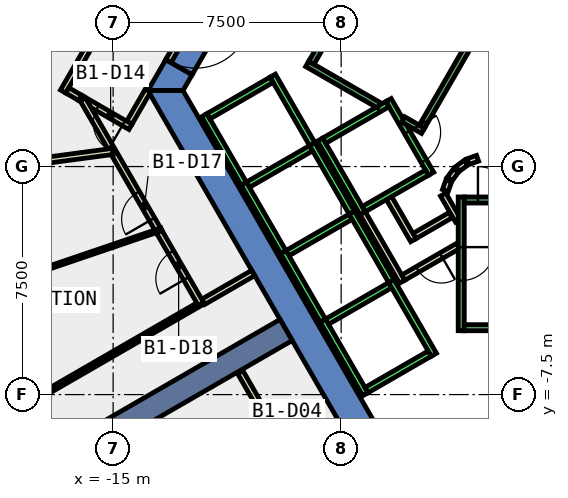
"""IFC4 building model, lengths in metres.
Left out: names, types, materials, properties, quantities, classifications, styles, units other than length and angle.
Written with IfcOpenShell. Run it as: python <this file> out.ifc"""

import sys

from ifc_helpers import new_model, si_unit, direction, frame, frame_2d, origin, place, context, subcontext, project, spatial, polyline, rectangle, outline, extrude, element, fill, save


model = new_model("IFC4")
c1 = context("Model", 3, precision=1e-05, world=origin(), true_north=direction((0.0, 1.0)))
c2 = subcontext(c1, "Body", "Model", "MODEL_VIEW")
j1 = project(units=[si_unit("LENGTHUNIT", "METRE"), si_unit("PLANEANGLEUNIT", "RADIAN")], contexts=[c1])
p1 = place(None, origin())
s1 = spatial("IfcSite", under=j1, at=p1, CompositionType="ELEMENT")
p2 = place(p1, origin())
s2 = spatial("IfcBuilding", under=s1, at=p2, CompositionType="ELEMENT")
p3 = place(p2, frame((0.0, 0.0, -5.5)))
s3 = spatial("IfcBuildingStorey", under=s2, at=p3, CompositionType="ELEMENT", Elevation=-5.5)
p4 = place(p3, frame((0.0, 0.0, -0.42)))
e1 = element("IfcWall", 1, at=p4, inside=s3, PredefinedType="SHEAR", context=c2, shape_type="SweptSolid", body=[
    extrude(outline(polyline([(-12.402, 3.02), (-13.267, 3.52), (-13.856, 2.5), (-12.702, 2.5), (-12.402, 3.02)])), origin(), (0.0, 0.0, 1.0), 5.42),
])
p5 = place(p3, frame((0.0, 0.0, 3.6)))
e2 = element("IfcWall", 2, at=p5, inside=s3, PredefinedType="SHEAR", context=c2, shape_type="SweptSolid", body=[
    extrude(outline(polyline([(-13.267, 3.52), (-12.402, 3.02), (-11.402, 4.752), (-12.267, 5.252), (-13.267, 3.52)])), origin(), (0.0, 0.0, 1.0), 1.4),
])
p6 = place(p3, frame((0.0, 0.0, -0.42)))
e3 = element("IfcWall", 3, at=p6, inside=s3, PredefinedType="SHEAR", context=c2, shape_type="SweptSolid", body=[
    extrude(outline(polyline([(-13.856, 2.5), (-6.928, -9.5), (-6.351, -8.5), (-12.702, 2.5), (-13.856, 2.5)])), origin(), (0.0, 0.0, 1.0), 5.42),
])
p7 = place(p3, frame((-9.31, -5.375, -0.42), z_axis=(0.0, 0.0, 1.0), x_axis=(-0.866017533419, -0.500013631625, 0.0)))
e4 = element("IfcWall", 4, at=p7, inside=s3, PredefinedType="SHEAR", context=c2, shape_type="SweptSolid", body=[
    extrude(rectangle(XDim=9.0, YDim=0.8, at=frame_2d((4.5, 0.0))), origin(), (0.0, 0.0, 1.0), 5.42),
])
p8 = place(p3, frame((-8.033, -11.587, 0.0), z_axis=(0.0, 0.0, 1.0), x_axis=(-0.499991937534, 0.866030058601, 0.0)))
e5 = element("IfcWall", 5, at=p8, inside=s3, PredefinedType="PARTITIONING", context=c2, shape_type="SweptSolid", body=[
    extrude(rectangle(XDim=5.568, YDim=0.2, at=frame_2d((2.784, 0.0))), origin(), (0.0, 0.0, 1.0), 4.9),
])
p9 = place(p8, frame((1.988, 0.0, 0.0)))
e6 = element("IfcOpeningElement", 6, at=p9, cuts=e5, PredefinedType="OPENING", context=c2, shape_type="SweptSolid", body=[
    extrude(rectangle(XDim=1.0, YDim=2.1, at=frame_2d((0.5, 1.05))), frame((0.0, 0.11, 0.0), z_axis=(0.0, -1.0, 0.0), x_axis=(1.0, 0.0, 0.0)), (0.0, 0.0, 1.0), 0.22),
])
p10 = place(p3, frame((-12.037, -4.45, 0.0), z_axis=(0.0, 0.0, 1.0), x_axis=(0.865980106173, 0.500078449558, 0.0)))
e7 = element("IfcWall", 7, at=p10, inside=s3, PredefinedType="PARTITIONING", context=c2, shape_type="SweptSolid", body=[
    extrude(rectangle(XDim=1.9, YDim=0.2, at=frame_2d((0.95, 0.0))), origin(), (0.0, 0.0, 1.0), 4.9),
])
p11 = place(p3, frame((-22.615, -10.556, 0.0), z_axis=(0.0, 0.0, 1.0), x_axis=(0.866067424309, 0.499927211253, 0.0)))
e8 = element("IfcWall", 8, at=p11, inside=s3, PredefinedType="PARTITIONING", context=c2, shape_type="SweptSolid", body=[
    extrude(rectangle(XDim=12.214, YDim=0.15, at=frame_2d((6.107, 0.0))), origin(), (0.0, 0.0, 1.0), 4.9),
])
p12 = place(p3, frame((-13.856, 2.5, 0.0), z_axis=(0.0, 0.0, 1.0), x_axis=(-0.500114474492, -0.865959301817, 0.0)))
e9 = element("IfcWall", 9, at=p12, inside=s3, PredefinedType="PARTITIONING", context=c2, shape_type="SweptSolid", body=[
    extrude(rectangle(XDim=1.222, YDim=0.2, at=frame_2d((0.611, 0.0))), origin(), (0.0, 0.0, 1.0), 4.9),
])
p13 = place(p3, frame((-14.43, 1.305, 0.0), z_axis=(0.0, 0.0, 1.0), x_axis=(-0.866000389056, 0.500043324278, 0.0)))
e10 = element("IfcWall", 10, at=p13, inside=s3, PredefinedType="PARTITIONING", context=c2, shape_type="SweptSolid", body=[
    extrude(rectangle(XDim=1.91, YDim=0.2, at=frame_2d((0.955, 0.0))), origin(), (0.0, 0.0, 1.0), 4.9),
])
p14 = place(p13, frame((0.254, 0.0, 0.0)))
e11 = element("IfcOpeningElement", 11, at=p14, cuts=e10, PredefinedType="OPENING", context=c2, shape_type="SweptSolid", body=[
    extrude(rectangle(XDim=1.0, YDim=2.1, at=frame_2d((0.5, 1.05))), frame((0.0, 0.11, 0.0), z_axis=(0.0, -1.0, 0.0), x_axis=(1.0, 0.0, 0.0)), (0.0, 0.0, 1.0), 0.22),
])
p15 = place(p3, frame((-16.645, 2.468, 0.0), z_axis=(0.0, 0.0, 1.0), x_axis=(0.499968011863, 0.866043871356, 0.0)))
e12 = element("IfcWall", 12, at=p15, inside=s3, PredefinedType="PARTITIONING", context=c2, shape_type="SweptSolid", body=[
    extrude(rectangle(XDim=7.201, YDim=0.2, at=frame_2d((3.6, 0.0))), origin(), (0.0, 0.0, 1.0), 4.9),
])
p16 = place(p15, frame((2.409, 0.0, 0.0)))
e13 = element("IfcOpeningElement", 13, at=p16, cuts=e12, PredefinedType="OPENING", context=c2, shape_type="SweptSolid", body=[
    extrude(rectangle(XDim=1.0, YDim=2.1, at=frame_2d((0.5, 1.05))), frame((0.0, 0.11, 0.0), z_axis=(0.0, -1.0, 0.0), x_axis=(1.0, 0.0, 0.0)), (0.0, 0.0, 1.0), 0.22),
])
p17 = place(p3, frame((-16.508, 2.505, 0.0), z_axis=(0.0, 0.0, 1.0), x_axis=(0.865494662716, -0.500918145819, 0.0)))
e14 = element("IfcWall", 14, at=p17, inside=s3, PredefinedType="PARTITIONING", context=c2, shape_type="SweptSolid", body=[
    extrude(rectangle(XDim=0.489, YDim=0.2, at=frame_2d((0.244, 0.0))), origin(), (0.0, 0.0, 1.0), 4.9),
])
p18 = place(p3, frame((-13.485, -2.142, 0.0), z_axis=(0.0, 0.0, 1.0), x_axis=(-0.500042049778, 0.866001124973, 0.0)))
e15 = element("IfcWall", 15, at=p18, inside=s3, PredefinedType="PARTITIONING", context=c2, shape_type="SweptSolid", body=[
    extrude(rectangle(XDim=5.025, YDim=0.2, at=frame_2d((2.513, 0.0))), origin(), (0.0, 0.0, 1.0), 4.9),
])
p19 = place(p18, frame((0.47, 0.0, 0.0)))
e16 = element("IfcOpeningElement", 16, at=p19, cuts=e15, PredefinedType="OPENING", context=c2, shape_type="SweptSolid", body=[
    extrude(rectangle(XDim=1.0, YDim=2.1, at=frame_2d((0.5, 1.05))), frame((0.0, 0.11, 0.0), z_axis=(0.0, -1.0, 0.0), x_axis=(1.0, 0.0, 0.0)), (0.0, 0.0, 1.0), 0.22),
])
p20 = place(p3, frame((-12.111, -4.522, 0.0), z_axis=(0.0, 0.0, 1.0), x_axis=(-0.499999305434, 0.866025804792, 0.0)))
e17 = element("IfcWall", 17, at=p20, inside=s3, PredefinedType="PARTITIONING", context=c2, shape_type="SweptSolid", body=[
    extrude(rectangle(XDim=2.748, YDim=0.2, at=frame_2d((1.374, 0.0))), origin(), (0.0, 0.0, 1.0), 4.9),
])
p21 = place(p20, frame((0.968, 0.0, 0.0)))
e18 = element("IfcOpeningElement", 18, at=p21, cuts=e17, PredefinedType="OPENING", context=c2, shape_type="SweptSolid", body=[
    extrude(rectangle(XDim=1.0, YDim=2.1, at=frame_2d((0.5, 1.05))), frame((0.0, 0.11, 0.0), z_axis=(0.0, -1.0, 0.0), x_axis=(1.0, 0.0, 0.0)), (0.0, 0.0, 1.0), 0.22),
])
p22 = place(p3, frame((-15.01, 0.498, 0.0), z_axis=(0.0, 0.0, 1.0), x_axis=(-0.991211581173, -0.132286058785, 0.0)))
e19 = element("IfcWall", 19, at=p22, inside=s3, PredefinedType="PARTITIONING", context=c2, shape_type="SweptSolid", body=[
    extrude(rectangle(XDim=7.582, YDim=0.2, at=frame_2d((3.791, 0.0))), origin(), (0.0, 0.0, 1.0), 4.9),
])
p23 = place(p3, frame((-13.416, -2.067, 0.0), z_axis=(0.0, 0.0, 1.0), x_axis=(-0.946668320361, -0.3222097007, 0.0)))
e20 = element("IfcWall", 20, at=p23, inside=s3, PredefinedType="PARTITIONING", context=c2, shape_type="SweptSolid", body=[
    extrude(rectangle(XDim=9.724, YDim=0.1, at=frame_2d((4.862, 0.0))), origin(), (0.0, 0.0, 1.0), 4.9),
])
p24 = place(p3, frame((-3.9, -1.599, 0.0), z_axis=(0.0, 0.0, 1.0), x_axis=(-0.865969445389, -0.500096910261, 0.0)))
e21 = element("IfcWall", 21, at=p24, inside=s3, PredefinedType="PARTITIONING", context=c2, shape_type="SweptSolid", body=[
    extrude(rectangle(XDim=1.373, YDim=0.2, at=frame_2d((0.687, 0.0))), origin(), (0.0, 0.0, 1.0), 4.9),
])
p25 = place(p3, frame((-5.126, -2.422, 0.0), z_axis=(0.0, 0.0, 1.0), x_axis=(-0.500062241894, 0.865989465428, 0.0)))
e22 = element("IfcWall", 22, at=p25, inside=s3, PredefinedType="PARTITIONING", context=c2, shape_type="SweptSolid", body=[
    extrude(rectangle(XDim=1.7, YDim=0.2, at=frame_2d((0.85, 0.0))), origin(), (0.0, 0.0, 1.0), 4.9),
])
p26 = place(p3, frame((-5.492, -3.788, 0.0), z_axis=(0.0, 0.0, 1.0), x_axis=(-0.500008949224, 0.866020236886, 0.0)))
e23 = element("IfcWall", 23, at=p26, inside=s3, PredefinedType="PARTITIONING", context=c2, shape_type="SweptSolid", body=[
    extrude(rectangle(XDim=2.68, YDim=0.2, at=frame_2d((1.34, 0.0))), origin(), (0.0, 0.0, 1.0), 4.9),
])
p27 = place(p3, frame((-4.145, -0.92, 0.0), z_axis=(0.0, 0.0, 1.0), x_axis=(0.499743786207, -0.866173278362, 0.0)))
e24 = element("IfcWall", 24, at=p27, inside=s3, PredefinedType="PARTITIONING", context=c2, shape_type="SweptSolid", body=[
    extrude(rectangle(XDim=0.991, YDim=0.2, at=frame_2d((0.495, 0.0))), origin(), (0.0, 0.0, 1.0), 4.9),
])
p28 = place(p3, frame((-3.65, -2.61, 0.0), z_axis=(0.0, 0.0, 1.0), x_axis=(-0.866072462134, -0.499918483688, 0.0)))
e25 = element("IfcWall", 25, at=p28, inside=s3, PredefinedType="PARTITIONING", context=c2, shape_type="SweptSolid", body=[
    extrude(rectangle(XDim=2.084, YDim=0.2, at=frame_2d((1.042, 0.0))), origin(), (0.0, 0.0, 1.0), 4.9),
])
p29 = place(p28, frame((0.642, 0.0, 0.0)))
e26 = element("IfcOpeningElement", 26, at=p29, cuts=e25, PredefinedType="OPENING", context=c2, shape_type="SweptSolid", body=[
    extrude(rectangle(XDim=0.9, YDim=2.1, at=frame_2d((0.45, 1.05))), frame((0.0, 0.11, 0.0), z_axis=(0.0, -1.0, 0.0), x_axis=(1.0, 0.0, 0.0)), (0.0, 0.0, 1.0), 0.22),
])
p30 = place(p3, frame((-3.012, 0.273, 0.0), z_axis=(0.0, 0.0, 1.0), x_axis=(-0.942280615813, -0.334824194261, 0.0)))
e27 = element("IfcWall", 27, at=p30, inside=s3, PredefinedType="PARTITIONING", context=c2, shape_type="SweptSolid", body=[
    extrude(rectangle(XDim=0.338, YDim=0.2, at=frame_2d((0.169, 0.0))), origin(), (0.0, 0.0, 1.0), 4.9),
])
p31 = place(p3, frame((-3.397, 0.124, 0.0), z_axis=(0.0, 0.0, 1.0), x_axis=(-0.804311165252, -0.594208338422, 0.0)))
e28 = element("IfcWall", 28, at=p31, inside=s3, PredefinedType="PARTITIONING", context=c2, shape_type="SweptSolid", body=[
    extrude(rectangle(XDim=0.338, YDim=0.2, at=frame_2d((0.169, 0.0))), origin(), (0.0, 0.0, 1.0), 4.9),
])
p32 = place(p3, frame((-3.723, -0.131, 0.0), z_axis=(0.0, 0.0, 1.0), x_axis=(-0.594675113454, -0.803966112121, 0.0)))
e29 = element("IfcWall", 29, at=p32, inside=s3, PredefinedType="PARTITIONING", context=c2, shape_type="SweptSolid", body=[
    extrude(rectangle(XDim=0.338, YDim=0.2, at=frame_2d((0.169, 0.0))), origin(), (0.0, 0.0, 1.0), 4.9),
])
p33 = place(p3, frame((-3.96, -0.47, 0.0), z_axis=(0.0, 0.0, 1.0), x_axis=(-0.334824194261, -0.942280615813, 0.0)))
e30 = element("IfcWall", 30, at=p33, inside=s3, PredefinedType="PARTITIONING", context=c2, shape_type="SweptSolid", body=[
    extrude(rectangle(XDim=0.338, YDim=0.2, at=frame_2d((0.169, 0.0))), origin(), (0.0, 0.0, 1.0), 4.9),
])
p34 = place(p3, frame((-2.771, 4.7, 0.0), z_axis=(0.0, 0.0, 1.0), x_axis=(0.499969479948, -0.866043023828, 0.0)))
e31 = element("IfcWall", 31, at=p34, inside=s3, PredefinedType="PARTITIONING", context=c2, shape_type="SweptSolid", body=[
    extrude(rectangle(XDim=4.99, YDim=0.2, at=frame_2d((2.495, 0.0))), origin(), (0.0, 0.0, 1.0), 4.9),
])
p35 = place(p34, frame((1.945, 0.0, 0.0)))
e32 = element("IfcOpeningElement", 32, at=p35, cuts=e31, PredefinedType="OPENING", context=c2, shape_type="SweptSolid", body=[
    extrude(rectangle(XDim=1.0, YDim=2.1, at=frame_2d((0.5, 1.05))), frame((0.0, 0.11, 0.0), z_axis=(0.0, -1.0, 0.0), x_axis=(1.0, 0.0, 0.0)), (0.0, 0.0, 1.0), 0.22),
])
p36 = place(p3, frame((-12.18, 5.202, 0.0), z_axis=(0.0, 0.0, 1.0), x_axis=(-0.50002537861, -0.866010750942, 0.0)))
e33 = element("IfcWall", 33, at=p36, inside=s3, PredefinedType="PARTITIONING", context=c2, shape_type="SweptSolid", body=[
    extrude(rectangle(XDim=2.0, YDim=0.2, at=frame_2d((1.0, 0.0))), origin(), (0.0, 0.0, 1.0), 2.4),
])
p37 = place(p36, frame((0.19, 0.0, 0.0)))
e34 = element("IfcOpeningElement", 34, at=p37, cuts=e33, PredefinedType="OPENING", context=c2, shape_type="SweptSolid", body=[
    extrude(rectangle(XDim=1.8, YDim=2.1, at=frame_2d((0.9, 1.05))), frame((0.0, 0.11, 0.0), z_axis=(0.0, -1.0, 0.0), x_axis=(1.0, 0.0, 0.0)), (0.0, 0.0, 1.0), 0.22),
])
p38 = place(p3, frame((-5.94, 2.188, 0.0), z_axis=(0.0, 0.0, 1.0), x_axis=(0.49994636267, -0.866056369097, 0.0)))
e35 = element("IfcWall", 35, at=p38, inside=s3, PredefinedType="STANDARD", context=c2, shape_type="SweptSolid", body=[
    extrude(rectangle(XDim=2.8, YDim=0.2, at=frame_2d((1.4, 0.0))), origin(), (0.0, 0.0, 1.0), 4.9),
])
p39 = place(p38, frame((1.225, 0.0, 0.0)))
e36 = element("IfcOpeningElement", 36, at=p39, cuts=e35, PredefinedType="OPENING", context=c2, shape_type="SweptSolid", body=[
    extrude(rectangle(XDim=1.1, YDim=2.1, at=frame_2d((0.55, 1.05))), frame((0.0, 0.11, 0.0), z_axis=(0.0, -1.0, 0.0), x_axis=(1.0, 0.0, 0.0)), (0.0, 0.0, 1.0), 0.22),
])
p40 = place(p3, frame((-8.192, 0.888, 0.0), z_axis=(0.0, 0.0, 1.0), x_axis=(0.49994636267, -0.866056369097, 0.0)))
e37 = element("IfcWall", 37, at=p40, inside=s3, PredefinedType="STANDARD", context=c2, shape_type="SweptSolid", body=[
    extrude(rectangle(XDim=2.8, YDim=0.2, at=frame_2d((1.4, 0.0))), origin(), (0.0, 0.0, 1.0), 4.9),
])
for number, where, z_axis, x_axis in (
    (38, (-5.977, 2.052, 0.0), (0.0, 0.0, 1.0), (-0.866, -0.5, 0.0)),
    (39, (-4.677, -0.2, 0.0), (0.0, 0.0, 1.0), (-0.866, -0.5, 0.0)),
):
    element("IfcWall", number, at=place(p3, frame(where, z_axis=z_axis, x_axis=x_axis)), inside=s3, PredefinedType="STANDARD", context=c2, shape_type="SweptSolid", body=[
        extrude(rectangle(XDim=2.399, YDim=0.2, at=frame_2d((1.2, 0.0))), origin(), (0.0, 0.0, 1.0), 4.9),
    ])
for number, where, z_axis, x_axis in (
    (40, (-9.751, 2.99, 0.0), (0.0, 0.0, 1.0), (0.5, -0.866, 0.0)),
    (41, (-12.003, 1.69, 0.0), (0.0, 0.0, 1.0), (0.5, -0.866, 0.0)),
):
    element("IfcWall", number, at=place(p3, frame(where, z_axis=z_axis, x_axis=x_axis)), inside=s3, PredefinedType="STANDARD", context=c2, shape_type="SweptSolid", body=[
        extrude(rectangle(XDim=2.8, YDim=0.2, at=frame_2d((1.4, 0.0))), origin(), (0.0, 0.0, 1.0), 3.6),
    ])
for number, where, z_axis, x_axis in (
    (42, (-9.788, 2.853, 0.0), (0.0, 0.0, 1.0), (-0.866, -0.5, 0.0)),
    (43, (-8.488, 0.602, 0.0), (0.0, 0.0, 1.0), (-0.866, -0.5, 0.0)),
):
    element("IfcWall", number, at=place(p3, frame(where, z_axis=z_axis, x_axis=x_axis)), inside=s3, PredefinedType="STANDARD", context=c2, shape_type="SweptSolid", body=[
        extrude(rectangle(XDim=2.399, YDim=0.2, at=frame_2d((1.2, 0.0))), origin(), (0.0, 0.0, 1.0), 3.6),
    ])
for number, where, z_axis, x_axis in (
    (44, (-8.451, 0.738, 0.0), (0.0, 0.0, 1.0), (0.5, -0.866, 0.0)),
    (45, (-10.703, -0.562, 0.0), (0.0, 0.0, 1.0), (0.5, -0.866, 0.0)),
):
    element("IfcWall", number, at=place(p3, frame(where, z_axis=z_axis, x_axis=x_axis)), inside=s3, PredefinedType="STANDARD", context=c2, shape_type="SweptSolid", body=[
        extrude(rectangle(XDim=2.8, YDim=0.2, at=frame_2d((1.4, 0.0))), origin(), (0.0, 0.0, 1.0), 3.6),
    ])
p41 = place(p3, frame((-7.188, -1.65, 0.0), z_axis=(0.0, 0.0, 1.0), x_axis=(-0.865955154139, -0.50012165622, 0.0)))
e46 = element("IfcWall", 46, at=p41, inside=s3, PredefinedType="STANDARD", context=c2, shape_type="SweptSolid", body=[
    extrude(rectangle(XDim=2.4, YDim=0.2, at=frame_2d((1.2, 0.0))), origin(), (0.0, 0.0, 1.0), 3.6),
])
p42 = place(p3, frame((-7.151, -1.513, 0.0), z_axis=(0.0, 0.0, 1.0), x_axis=(0.49994636267, -0.866056369097, 0.0)))
e47 = element("IfcWall", 47, at=p42, inside=s3, PredefinedType="STANDARD", context=c2, shape_type="SweptSolid", body=[
    extrude(rectangle(XDim=2.8, YDim=0.2, at=frame_2d((1.4, 0.0))), origin(), (0.0, 0.0, 1.0), 3.6),
])
p43 = place(p3, frame((-9.403, -2.813, 0.0), z_axis=(0.0, 0.0, 1.0), x_axis=(0.500011755427, -0.866018616679, 0.0)))
e48 = element("IfcWall", 48, at=p43, inside=s3, PredefinedType="STANDARD", context=c2, shape_type="SweptSolid", body=[
    extrude(rectangle(XDim=2.8, YDim=0.2, at=frame_2d((1.4, 0.0))), origin(), (0.0, 0.0, 1.0), 3.6),
])
p44 = place(p3, frame((-5.888, -3.902, 0.0), z_axis=(0.0, 0.0, 1.0), x_axis=(-0.865999212041, -0.500045362686, 0.0)))
e49 = element("IfcWall", 49, at=p44, inside=s3, PredefinedType="STANDARD", context=c2, shape_type="SweptSolid", body=[
    extrude(rectangle(XDim=2.4, YDim=0.2, at=frame_2d((1.2, 0.0))), origin(), (0.0, 0.0, 1.0), 3.6),
])
for number, where, z_axis, x_axis in (
    (50, (-5.851, -3.765, 0.0), (0.0, 0.0, 1.0), (0.5, -0.866, 0.0)),
    (51, (-8.103, -5.065, 0.0), (0.0, 0.0, 1.0), (0.5, -0.866, 0.0)),
):
    element("IfcWall", number, at=place(p3, frame(where, z_axis=z_axis, x_axis=x_axis)), inside=s3, PredefinedType="STANDARD", context=c2, shape_type="SweptSolid", body=[
        extrude(rectangle(XDim=2.8, YDim=0.2, at=frame_2d((1.4, 0.0))), origin(), (0.0, 0.0, 1.0), 3.6),
    ])
p45 = place(p3, frame((-4.588, -6.153, 0.0), z_axis=(0.0, 0.0, 1.0), x_axis=(-0.865999212041, -0.500045362686, 0.0)))
e52 = element("IfcWall", 52, at=p45, inside=s3, PredefinedType="STANDARD", context=c2, shape_type="SweptSolid", body=[
    extrude(rectangle(XDim=2.4, YDim=0.2, at=frame_2d((1.2, 0.0))), origin(), (0.0, 0.0, 1.0), 3.6),
])
p46 = place(p3, frame((-3.55, -1.0, 0.0), z_axis=(0.0, 0.0, 1.0), x_axis=(0.0, -1.0, 0.0)))
e53 = element("IfcWall", 53, at=p46, inside=s3, PredefinedType="STANDARD", context=c2, shape_type="SweptSolid", body=[
    extrude(rectangle(XDim=4.4, YDim=0.2, at=frame_2d((2.2, 0.0))), origin(), (0.0, 0.0, 1.0), 4.9),
])
p47 = place(p46, frame((1.65, 0.0, 0.0)))
e54 = element("IfcOpeningElement", 54, at=p47, cuts=e53, PredefinedType="OPENING", context=c2, shape_type="SweptSolid", body=[
    extrude(rectangle(XDim=1.1, YDim=2.2, at=frame_2d((0.55, 1.1))), frame((0.0, 0.11, 0.0), z_axis=(0.0, -1.0, 0.0), x_axis=(1.0, 0.0, 0.0)), (0.0, 0.0, 1.0), 0.22),
])
p48 = place(p3, frame((-3.45, -1.1, 0.0), z_axis=(0.0, 0.0, 1.0), x_axis=(1.0, 0.0, 0.0)))
e55 = element("IfcWall", 55, at=p48, inside=s3, PredefinedType="STANDARD", context=c2, shape_type="SweptSolid", body=[
    extrude(rectangle(XDim=6.9, YDim=0.2, at=frame_2d((3.45, 0.0))), origin(), (0.0, 0.0, 1.0), 4.9),
])
p49 = place(p48, frame((0.45, 0.0, 0.0)))
e56 = element("IfcOpeningElement", 56, at=p49, cuts=e55, PredefinedType="OPENING", context=c2, shape_type="SweptSolid", body=[
    extrude(rectangle(XDim=1.1, YDim=2.2, at=frame_2d((0.55, 1.1))), frame((0.0, 0.11, 0.0), z_axis=(0.0, -1.0, 0.0), x_axis=(1.0, 0.0, 0.0)), (0.0, 0.0, 1.0), 0.22),
])
p50 = place(p3, frame((-3.45, -5.3, 0.0), z_axis=(0.0, 0.0, 1.0), x_axis=(1.0, 0.0, 0.0)))
e57 = element("IfcWall", 57, at=p50, inside=s3, PredefinedType="STANDARD", context=c2, shape_type="SweptSolid", body=[
    extrude(rectangle(XDim=6.9, YDim=0.2, at=frame_2d((3.45, 0.0))), origin(), (0.0, 0.0, 1.0), 4.9),
])
p51 = place(p3, frame((-6.25, 2.01, 0.0), z_axis=(0.0, 0.0, 1.0), x_axis=(-0.86611865017, 0.499838457731, 0.0)))
e58 = element("IfcWall", 58, at=p51, inside=s3, PredefinedType="STANDARD", context=c2, shape_type="SweptSolid", body=[
    extrude(rectangle(XDim=2.733, YDim=0.2, at=frame_2d((1.366, 0.0))), origin(), (0.0, 0.0, 1.0), 4.9),
])
p52 = place(p3, frame((-4.806, 1.176, 0.0), z_axis=(0.0, 0.0, 1.0), x_axis=(-0.866558586415, 0.499075361355, 0.0)))
e59 = element("IfcWall", 59, at=p52, inside=s3, PredefinedType="STANDARD", context=c2, shape_type="SweptSolid", body=[
    extrude(rectangle(XDim=0.751, YDim=0.2, at=frame_2d((0.376, 0.0))), origin(), (0.0, 0.0, 1.0), 4.9),
])
p53 = place(p3, frame((-1.393, 7.288, 0.0), z_axis=(0.0, 0.0, 1.0), x_axis=(-0.499963383562, -0.866046543262, 0.0)))
e60 = element("IfcWall", 60, at=p53, inside=s3, PredefinedType="STANDARD", context=c2, shape_type="SweptSolid", body=[
    extrude(rectangle(XDim=6.9, YDim=0.2, at=frame_2d((3.45, 0.0))), origin(), (0.0, 0.0, 1.0), 4.9),
])
p54 = place(p53, frame((0.45, 0.0, 0.0)))
e61 = element("IfcOpeningElement", 61, at=p54, cuts=e60, PredefinedType="OPENING", context=c2, shape_type="SweptSolid", body=[
    extrude(rectangle(XDim=1.1, YDim=2.2, at=frame_2d((0.55, 1.1))), frame((0.0, 0.11, 0.0), z_axis=(0.0, -1.0, 0.0), x_axis=(1.0, 0.0, 0.0)), (0.0, 0.0, 1.0), 0.22),
])
p55 = place(p3, frame((-5.03, 9.388, 0.0), z_axis=(0.0, 0.0, 1.0), x_axis=(-0.499978703459, -0.866037698999, 0.0)))
e62 = element("IfcWall", 62, at=p55, inside=s3, PredefinedType="STANDARD", context=c2, shape_type="SweptSolid", body=[
    extrude(rectangle(XDim=6.9, YDim=0.2, at=frame_2d((3.45, 0.0))), origin(), (0.0, 0.0, 1.0), 4.9),
])
p56 = place(p14, origin())
e63 = element("IfcDoor", 63, at=p56, inside=s3, OperationType="SINGLE_SWING_RIGHT", PredefinedType="DOOR", context=c2, shape_type="SweptSolid", body=[
    extrude(rectangle(XDim=1.0, YDim=2.1, at=frame_2d((0.5, 1.05))), frame((0.0, 0.025, 0.0), z_axis=(0.0, -1.0, 0.0), x_axis=(1.0, 0.0, 0.0)), (0.0, 0.0, 1.0), 0.05),
])
fill(e11, e63)
p57 = place(p19, origin())
e64 = element("IfcDoor", 64, at=p57, inside=s3, OperationType="SINGLE_SWING_LEFT", PredefinedType="DOOR", context=c2, shape_type="SweptSolid", body=[
    extrude(rectangle(XDim=1.0, YDim=2.1, at=frame_2d((0.5, 1.05))), frame((0.0, 0.025, 0.0), z_axis=(0.0, -1.0, 0.0), x_axis=(1.0, 0.0, 0.0)), (0.0, 0.0, 1.0), 0.05),
])
fill(e16, e64)
p58 = place(p21, origin())
e65 = element("IfcDoor", 65, at=p58, inside=s3, OperationType="SINGLE_SWING_RIGHT", PredefinedType="DOOR", context=c2, shape_type="SweptSolid", body=[
    extrude(rectangle(XDim=1.0, YDim=2.1, at=frame_2d((0.5, 1.05))), frame((0.0, 0.025, 0.0), z_axis=(0.0, -1.0, 0.0), x_axis=(1.0, 0.0, 0.0)), (0.0, 0.0, 1.0), 0.05),
])
fill(e18, e65)
p59 = place(p29, origin())
e66 = element("IfcDoor", 66, at=p59, inside=s3, OperationType="SINGLE_SWING_LEFT", PredefinedType="DOOR", context=c2, shape_type="SweptSolid", body=[
    extrude(rectangle(XDim=0.9, YDim=2.1, at=frame_2d((0.45, 1.05))), frame((0.0, 0.025, 0.0), z_axis=(0.0, -1.0, 0.0), x_axis=(1.0, 0.0, 0.0)), (0.0, 0.0, 1.0), 0.05),
])
fill(e26, e66)
p60 = place(p37, origin())
e67 = element("IfcDoor", 67, at=p60, inside=s3, OperationType="DOUBLE_DOOR_SINGLE_SWING", PredefinedType="DOOR", context=c2, shape_type="SweptSolid", body=[
    extrude(rectangle(XDim=1.8, YDim=2.1, at=frame_2d((0.9, 1.05))), frame((0.0, 0.025, 0.0), z_axis=(0.0, -1.0, 0.0), x_axis=(1.0, 0.0, 0.0)), (0.0, 0.0, 1.0), 0.05),
])
fill(e34, e67)
p61 = place(p39, origin())
e68 = element("IfcDoor", 68, at=p61, inside=s3, OperationType="SLIDING_TO_LEFT", PredefinedType="DOOR", context=c2, shape_type="SweptSolid", body=[
    extrude(rectangle(XDim=1.1, YDim=2.1, at=frame_2d((0.55, 1.05))), frame((0.0, 0.025, 0.0), z_axis=(0.0, -1.0, 0.0), x_axis=(1.0, 0.0, 0.0)), (0.0, 0.0, 1.0), 0.05),
])
fill(e36, e68)
p62 = place(p49, origin())
e69 = element("IfcDoor", 69, at=p62, inside=s3, OperationType="SINGLE_SWING_LEFT", PredefinedType="DOOR", context=c2, shape_type="SweptSolid", body=[
    extrude(rectangle(XDim=1.1, YDim=2.2, at=frame_2d((0.55, 1.1))), frame((0.0, 0.025, 0.0), z_axis=(0.0, -1.0, 0.0), x_axis=(1.0, 0.0, 0.0)), (0.0, 0.0, 1.0), 0.05),
])
fill(e56, e69)
p63 = place(p47, origin())
e70 = element("IfcDoor", 70, at=p63, inside=s3, OperationType="SINGLE_SWING_LEFT", PredefinedType="DOOR", context=c2, shape_type="SweptSolid", body=[
    extrude(rectangle(XDim=1.1, YDim=2.2, at=frame_2d((0.55, 1.1))), frame((0.0, 0.025, 0.0), z_axis=(0.0, -1.0, 0.0), x_axis=(1.0, 0.0, 0.0)), (0.0, 0.0, 1.0), 0.05),
])
fill(e54, e70)
save(model, sys.argv[1])
